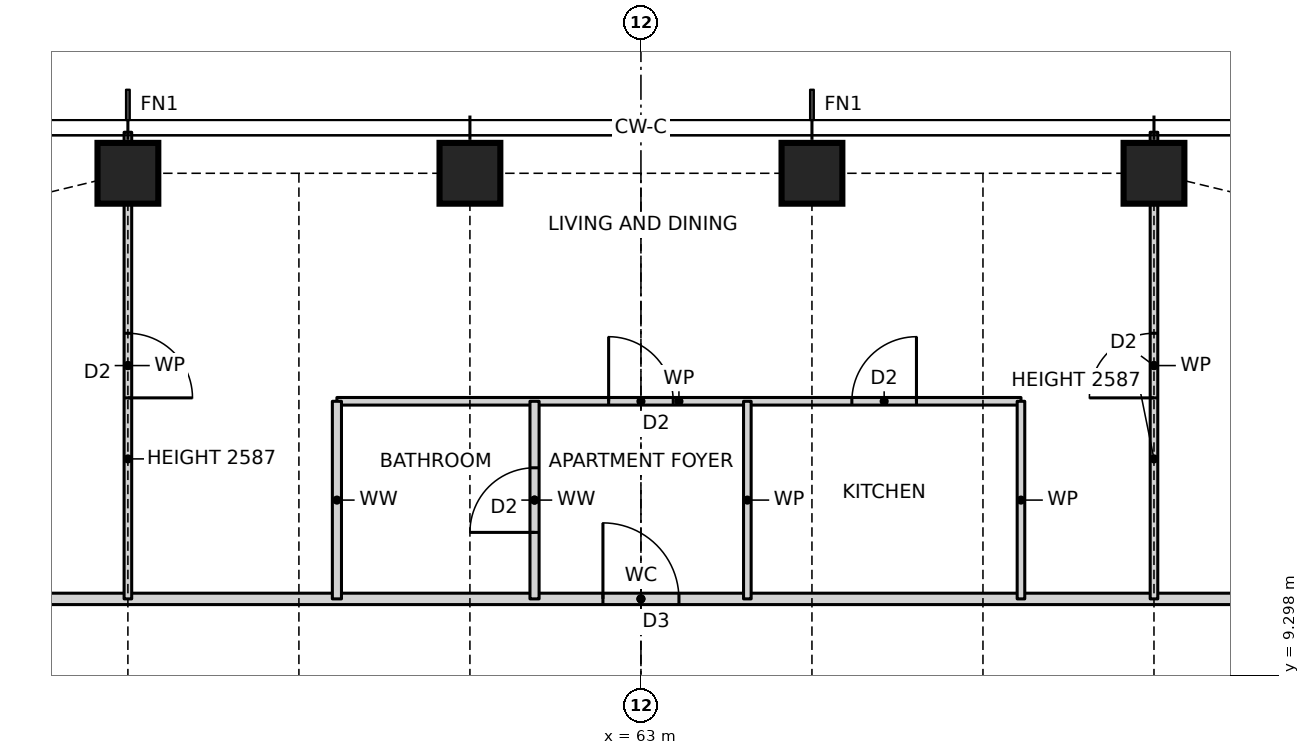
"""IFC4 building model, lengths in metres.
Left out: names, types, materials, properties, quantities, classifications, styles, units other than length and angle.
Written with IfcOpenShell. Run it as: python <this file> out.ifc"""

import sys

from ifc_helpers import new_model, si_unit, direction, frame, frame_2d, origin, origin_2d, place, context, subcontext, project, spatial, rectangle, hollow_rectangle, extrude, element, fill, save


model = new_model("IFC4")
c1 = context("Model", 3, precision=1e-05, world=origin(), true_north=direction((0.0, 1.0)))
c2 = subcontext(c1, "Body", "Model", "MODEL_VIEW")
j1 = project(units=[si_unit("LENGTHUNIT", "METRE"), si_unit("PLANEANGLEUNIT", "RADIAN")], contexts=[c1])
p1 = place(None, origin())
s1 = spatial("IfcSite", under=j1, at=p1, CompositionType="ELEMENT")
p2 = place(p1, origin())
s2 = spatial("IfcBuilding", under=s1, at=p2, CompositionType="ELEMENT")
p3 = place(p2, frame((0.0, 0.0, 122.5)))
s3 = spatial("IfcBuildingStorey", under=s2, at=p3, CompositionType="ELEMENT", Elevation=122.5)
for number, where, z_axis, x_axis in (
    (1, (69.75, 15.9, 0.0), (0.0, 0.0, 1.0), (1.0, 0.0, 0.0)),
    (2, (65.25, 15.9, 0.0), (0.0, 0.0, 1.0), (1.0, 0.0, 0.0)),
    (3, (60.75, 15.9, 0.0), (0.0, 0.0, 1.0), (1.0, 0.0, 0.0)),
    (4, (56.25, 15.9, 0.0), (0.0, 0.0, 1.0), (1.0, 0.0, 0.0)),
):
    element("IfcColumn", number, at=place(p3, frame(where, z_axis=z_axis, x_axis=x_axis)), inside=s3, PredefinedType="COLUMN", context=c2, shape_type="SweptSolid", body=[
        extrude(hollow_rectangle(XDim=0.8, YDim=0.8, WallThickness=0.1, at=origin_2d()), origin(), (0.0, 0.0, 1.0), 3.5),
    ])
p4 = place(p3, frame((53.7, 10.3, 0.0), z_axis=(0.0, 0.0, 1.0), x_axis=(1.0, 0.0, 0.0)))
e5 = element("IfcWall", 5, at=p4, inside=s3, PredefinedType="PARTITIONING", context=c2, shape_type="SweptSolid", body=[
    extrude(rectangle(XDim=18.6, YDim=0.15, at=frame_2d((9.3, 0.0))), origin(), (0.0, 0.0, 1.0), 3.27),
])
p5 = place(p4, frame((8.8, 0.0, 0.0)))
e6 = element("IfcOpeningElement", 6, at=p5, cuts=e5, PredefinedType="OPENING", context=c2, shape_type="SweptSolid", body=[
    extrude(rectangle(XDim=1.0, YDim=2.1, at=frame_2d((0.5, 1.05))), frame((0.0, 0.085, 0.0), z_axis=(0.0, -1.0, 0.0), x_axis=(1.0, 0.0, 0.0)), (0.0, 0.0, 1.0), 0.17),
])
p6 = place(p3, frame((59.0, 12.9, 0.0), z_axis=(0.0, 0.0, 1.0), x_axis=(1.0, 0.0, 0.0)))
e7 = element("IfcWall", 7, at=p6, inside=s3, PredefinedType="PARTITIONING", context=c2, shape_type="SweptSolid", body=[
    extrude(rectangle(XDim=9.0, YDim=0.1, at=frame_2d((4.5, 0.0))), origin(), (0.0, 0.0, 1.0), 3.27),
])
p7 = place(p6, frame((6.775, 0.0, 0.0)))
e8 = element("IfcOpeningElement", 8, at=p7, cuts=e7, PredefinedType="OPENING", context=c2, shape_type="SweptSolid", body=[
    extrude(rectangle(XDim=0.85, YDim=2.1, at=frame_2d((0.425, 1.05))), frame((0.0, 0.06, 0.0), z_axis=(0.0, -1.0, 0.0), x_axis=(1.0, 0.0, 0.0)), (0.0, 0.0, 1.0), 0.12),
])
p8 = place(p6, frame((3.575, 0.0, 0.0)))
e9 = element("IfcOpeningElement", 9, at=p8, cuts=e7, PredefinedType="OPENING", context=c2, shape_type="SweptSolid", body=[
    extrude(rectangle(XDim=0.85, YDim=2.1, at=frame_2d((0.425, 1.05))), frame((0.0, 0.06, 0.0), z_axis=(0.0, -1.0, 0.0), x_axis=(1.0, 0.0, 0.0)), (0.0, 0.0, 1.0), 0.12),
])
p9 = place(p3, frame((69.75, 10.3, 0.0), z_axis=(0.0, 0.0, 1.0), x_axis=(0.0, 1.0, 0.0)))
e10 = element("IfcWall", 10, at=p9, inside=s3, PredefinedType="PARTITIONING", context=c2, shape_type="SweptSolid", body=[
    extrude(rectangle(XDim=6.14, YDim=0.1, at=frame_2d((3.07, 0.0))), origin(), (0.0, 0.0, 1.0), 2.587),
])
p10 = place(p9, frame((2.645, 0.0, 0.0)))
e11 = element("IfcOpeningElement", 11, at=p10, cuts=e10, PredefinedType="OPENING", context=c2, shape_type="SweptSolid", body=[
    extrude(rectangle(XDim=0.85, YDim=2.1, at=frame_2d((0.425, 1.05))), frame((0.0, 0.06, 0.0), z_axis=(0.0, -1.0, 0.0), x_axis=(1.0, 0.0, 0.0)), (0.0, 0.0, 1.0), 0.12),
])
for number, where, z_axis, x_axis in (
    (12, (68.0, 10.3, 0.0), (0.0, 0.0, 1.0), (0.0, 1.0, 0.0)),
    (13, (64.4, 10.3, 0.0), (0.0, 0.0, 1.0), (0.0, 1.0, 0.0)),
):
    element("IfcWall", number, at=place(p3, frame(where, z_axis=z_axis, x_axis=x_axis)), inside=s3, PredefinedType="PARTITIONING", context=c2, shape_type="SweptSolid", body=[
        extrude(rectangle(XDim=2.6, YDim=0.1, at=frame_2d((1.3, 0.0))), origin(), (0.0, 0.0, 1.0), 3.27),
    ])
p11 = place(p3, frame((61.6, 10.3, 0.0), z_axis=(0.0, 0.0, 1.0), x_axis=(0.0, 1.0, 0.0)))
e14 = element("IfcWall", 14, at=p11, inside=s3, PredefinedType="PARTITIONING", context=c2, shape_type="SweptSolid", body=[
    extrude(rectangle(XDim=2.6, YDim=0.12, at=frame_2d((1.3, 0.0))), origin(), (0.0, 0.0, 1.0), 3.27),
])
p12 = place(p11, frame((0.875, 0.0, 0.0)))
e15 = element("IfcOpeningElement", 15, at=p12, cuts=e14, PredefinedType="OPENING", context=c2, shape_type="SweptSolid", body=[
    extrude(rectangle(XDim=0.85, YDim=2.1, at=frame_2d((0.425, 1.05))), frame((0.0, 0.07, 0.0), z_axis=(0.0, -1.0, 0.0), x_axis=(1.0, 0.0, 0.0)), (0.0, 0.0, 1.0), 0.14),
])
p13 = place(p3, frame((59.0, 10.3, 0.0), z_axis=(0.0, 0.0, 1.0), x_axis=(0.0, 1.0, 0.0)))
e16 = element("IfcWall", 16, at=p13, inside=s3, PredefinedType="PARTITIONING", context=c2, shape_type="SweptSolid", body=[
    extrude(rectangle(XDim=2.6, YDim=0.12, at=frame_2d((1.3, 0.0))), origin(), (0.0, 0.0, 1.0), 3.27),
])
p14 = place(p3, frame((56.25, 10.3, 0.0), z_axis=(0.0, 0.0, 1.0), x_axis=(0.0, 1.0, 0.0)))
e17 = element("IfcWall", 17, at=p14, inside=s3, PredefinedType="PARTITIONING", context=c2, shape_type="SweptSolid", body=[
    extrude(rectangle(XDim=6.14, YDim=0.1, at=frame_2d((3.07, 0.0))), origin(), (0.0, 0.0, 1.0), 2.587),
])
p15 = place(p14, frame((2.645, 0.0, 0.0)))
e18 = element("IfcOpeningElement", 18, at=p15, cuts=e17, PredefinedType="OPENING", context=c2, shape_type="SweptSolid", body=[
    extrude(rectangle(XDim=0.85, YDim=2.1, at=frame_2d((0.425, 1.05))), frame((0.0, 0.06, 0.0), z_axis=(0.0, -1.0, 0.0), x_axis=(1.0, 0.0, 0.0)), (0.0, 0.0, 1.0), 0.12),
])
p16 = place(p7, origin())
e19 = element("IfcDoor", 19, at=p16, inside=s3, OperationType="SINGLE_SWING_RIGHT", PredefinedType="DOOR", context=c2, shape_type="SweptSolid", body=[
    extrude(rectangle(XDim=0.85, YDim=2.1, at=frame_2d((0.425, 1.05))), frame((0.0, 0.025, 0.0), z_axis=(0.0, -1.0, 0.0), x_axis=(1.0, 0.0, 0.0)), (0.0, 0.0, 1.0), 0.05),
])
fill(e8, e19)
p17 = place(p5, origin())
e20 = element("IfcDoor", 20, at=p17, inside=s3, OperationType="SINGLE_SWING_LEFT", PredefinedType="DOOR", context=c2, shape_type="SweptSolid", body=[
    extrude(rectangle(XDim=1.0, YDim=2.1, at=frame_2d((0.5, 1.05))), frame((0.0, 0.025, 0.0), z_axis=(0.0, -1.0, 0.0), x_axis=(1.0, 0.0, 0.0)), (0.0, 0.0, 1.0), 0.05),
])
fill(e6, e20)
p18 = place(p8, origin())
e21 = element("IfcDoor", 21, at=p18, inside=s3, OperationType="SINGLE_SWING_LEFT", PredefinedType="DOOR", context=c2, shape_type="SweptSolid", body=[
    extrude(rectangle(XDim=0.85, YDim=2.1, at=frame_2d((0.425, 1.05))), frame((0.0, 0.025, 0.0), z_axis=(0.0, -1.0, 0.0), x_axis=(1.0, 0.0, 0.0)), (0.0, 0.0, 1.0), 0.05),
])
fill(e9, e21)
p19 = place(p12, origin())
e22 = element("IfcDoor", 22, at=p19, inside=s3, OperationType="SINGLE_SWING_LEFT", PredefinedType="DOOR", context=c2, shape_type="SweptSolid", body=[
    extrude(rectangle(XDim=0.85, YDim=2.1, at=frame_2d((0.425, 1.05))), frame((0.0, 0.025, 0.0), z_axis=(0.0, -1.0, 0.0), x_axis=(1.0, 0.0, 0.0)), (0.0, 0.0, 1.0), 0.05),
])
fill(e15, e22)
p20 = place(p10, origin())
e23 = element("IfcDoor", 23, at=p20, inside=s3, OperationType="SINGLE_SWING_LEFT", PredefinedType="DOOR", context=c2, shape_type="SweptSolid", body=[
    extrude(rectangle(XDim=0.85, YDim=2.1, at=frame_2d((0.425, 1.05))), frame((0.0, 0.025, 0.0), z_axis=(0.0, -1.0, 0.0), x_axis=(1.0, 0.0, 0.0)), (0.0, 0.0, 1.0), 0.05),
])
fill(e11, e23)
p21 = place(p15, frame((0.85, 0.0, 0.0), z_axis=(0.0, 0.0, 1.0), x_axis=(-1.0, 0.0, 0.0)))
e24 = element("IfcDoor", 24, at=p21, inside=s3, OperationType="SINGLE_SWING_RIGHT", PredefinedType="DOOR", context=c2, shape_type="SweptSolid", body=[
    extrude(rectangle(XDim=0.85, YDim=2.1, at=frame_2d((0.425, 1.05))), frame((0.0, 0.025, 0.0), z_axis=(0.0, -1.0, 0.0), x_axis=(1.0, 0.0, 0.0)), (0.0, 0.0, 1.0), 0.05),
])
fill(e18, e24)
save(model, sys.argv[1])
